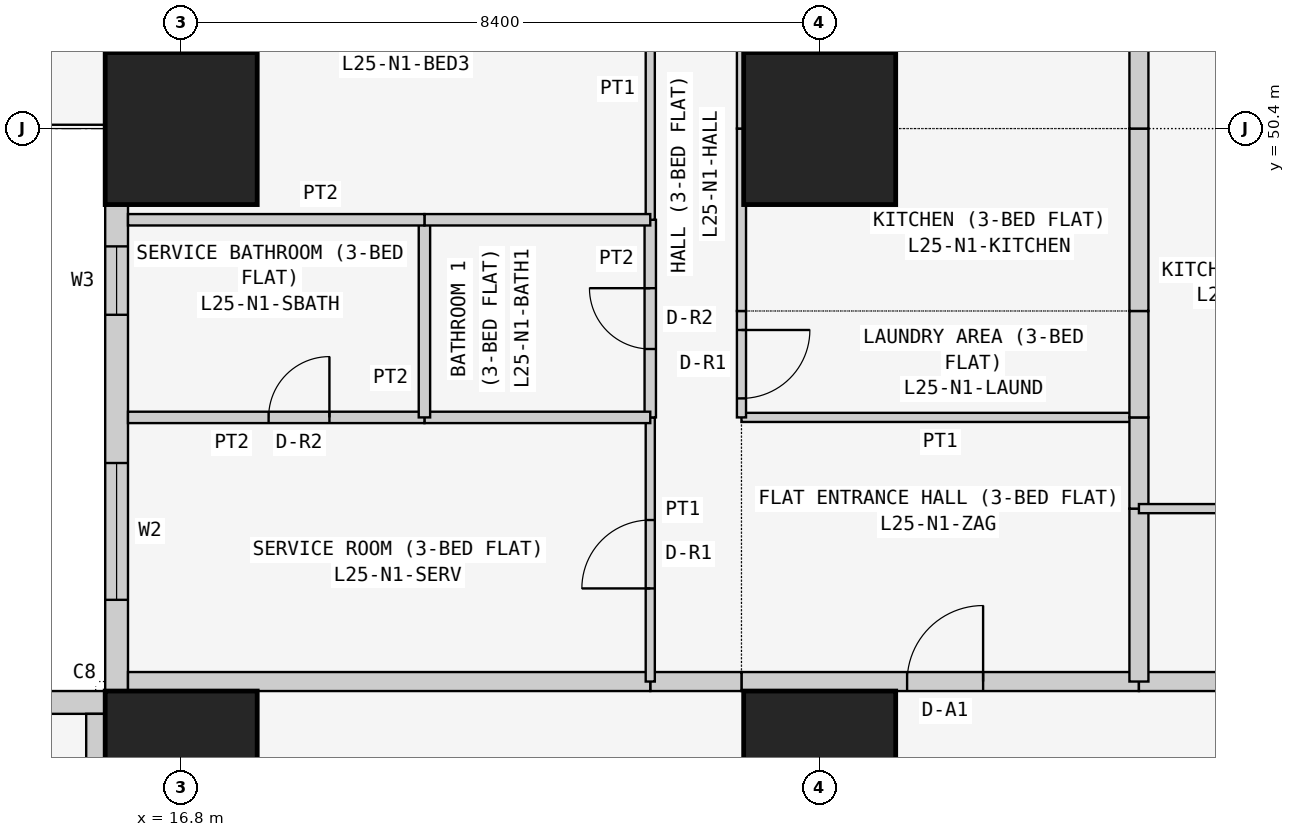
"""IFC4 building model, lengths in metres.
Left out: names, types, materials, properties, quantities, classifications, styles, units other than length and angle.
Written with IfcOpenShell. Run it as: python <this file> out.ifc"""

import sys

from ifc_helpers import new_model, si_unit, direction, frame, frame_2d, origin, origin_2d, place, context, subcontext, project, spatial, rectangle, extrude, element, fill, save


model = new_model("IFC4")
c1 = context("Model", 3, precision=1e-05, world=origin(), true_north=direction((0.0, 1.0)))
c2 = subcontext(c1, "Body", "Model", "MODEL_VIEW")
j1 = project(units=[si_unit("LENGTHUNIT", "METRE"), si_unit("PLANEANGLEUNIT", "RADIAN")], contexts=[c1])
p1 = place(None, origin())
s1 = spatial("IfcSite", under=j1, at=p1, CompositionType="ELEMENT")
p2 = place(p1, origin())
s2 = spatial("IfcBuilding", under=s1, at=p2, CompositionType="ELEMENT")
p3 = place(p2, frame((0.0, 0.0, 99.3)))
s3 = spatial("IfcBuildingStorey", under=s2, at=p3, CompositionType="ELEMENT", Elevation=99.3)
for number, where, z_axis, x_axis in (
    (1, (16.8, 42.0, 0.0), (0.0, 0.0, 1.0), (1.0, 0.0, 0.0)),
    (2, (16.8, 50.4, 0.0), (0.0, 0.0, 1.0), (1.0, 0.0, 0.0)),
    (3, (25.2, 42.0, 0.0), (0.0, 0.0, 1.0), (1.0, 0.0, 0.0)),
    (4, (25.2, 50.4, 0.0), (0.0, 0.0, 1.0), (1.0, 0.0, 0.0)),
):
    element("IfcColumn", number, at=place(p3, frame(where, z_axis=z_axis, x_axis=x_axis)), inside=s3, PredefinedType="COLUMN", context=c2, shape_type="SweptSolid", body=[
        extrude(rectangle(XDim=2.0, YDim=2.0, at=origin_2d()), origin(), (0.0, 0.0, 1.0), 3.6),
    ])
p4 = place(p3, frame((15.8, 42.85, 0.0), z_axis=(0.0, 0.0, 1.0), x_axis=(-1.0, 0.0, 0.0)))
e5 = element("IfcWall", 5, at=p4, inside=s3, PredefinedType="SOLIDWALL", context=c2, shape_type="SweptSolid", body=[
    extrude(rectangle(XDim=15.4, YDim=0.3, at=frame_2d((7.7, 0.0))), origin(), (0.0, 0.0, 1.0), 3.35),
])
p5 = place(p4, frame((1.2, 0.0, 0.9)))
e6 = element("IfcOpeningElement", 6, at=p5, cuts=e5, PredefinedType="OPENING", context=c2, shape_type="SweptSolid", body=[
    extrude(rectangle(XDim=1.8, YDim=1.5, at=frame_2d((0.9, 0.75))), frame((0.0, 0.16, 0.0), z_axis=(0.0, -1.0, 0.0), x_axis=(1.0, 0.0, 0.0)), (0.0, 0.0, 1.0), 0.32),
])
p6 = place(p4, frame((4.95, 0.0, 1.5)))
e7 = element("IfcOpeningElement", 7, at=p6, cuts=e5, PredefinedType="OPENING", context=c2, shape_type="SweptSolid", body=[
    extrude(rectangle(XDim=0.9, YDim=0.7, at=frame_2d((0.45, 0.35))), frame((0.0, 0.16, 0.0), z_axis=(0.0, -1.0, 0.0), x_axis=(1.0, 0.0, 0.0)), (0.0, 0.0, 1.0), 0.32),
])
p7 = place(p4, frame((8.5, 0.0, 0.9)))
e8 = element("IfcOpeningElement", 8, at=p7, cuts=e5, PredefinedType="OPENING", context=c2, shape_type="SweptSolid", body=[
    extrude(rectangle(XDim=1.8, YDim=1.5, at=frame_2d((0.9, 0.75))), frame((0.0, 0.16, 0.0), z_axis=(0.0, -1.0, 0.0), x_axis=(1.0, 0.0, 0.0)), (0.0, 0.0, 1.0), 0.32),
])
p8 = place(p4, frame((12.5, 0.0, 0.0)))
e9 = element("IfcOpeningElement", 9, at=p8, cuts=e5, PredefinedType="OPENING", context=c2, shape_type="SweptSolid", body=[
    extrude(rectangle(XDim=0.9, YDim=2.4, at=frame_2d((0.45, 1.2))), frame((0.0, 0.16, 0.0), z_axis=(0.0, -1.0, 0.0), x_axis=(1.0, 0.0, 0.0)), (0.0, 0.0, 1.0), 0.32),
])
p9 = place(p4, frame((13.5, 0.0, 0.9)))
e10 = element("IfcOpeningElement", 10, at=p9, cuts=e5, PredefinedType="OPENING", context=c2, shape_type="SweptSolid", body=[
    extrude(rectangle(XDim=1.2, YDim=1.5, at=frame_2d((0.6, 0.75))), frame((0.0, 0.16, 0.0), z_axis=(0.0, -1.0, 0.0), x_axis=(1.0, 0.0, 0.0)), (0.0, 0.0, 1.0), 0.32),
])
p10 = place(p3, frame((15.95, 58.4, 0.0), z_axis=(0.0, 0.0, 1.0), x_axis=(0.0, -1.0, 0.0)))
e11 = element("IfcWall", 11, at=p10, inside=s3, PredefinedType="SOLIDWALL", context=c2, shape_type="SweptSolid", body=[
    extrude(rectangle(XDim=15.7, YDim=0.3, at=frame_2d((7.85, 0.0))), origin(), (0.0, 0.0, 1.0), 3.35),
])
p11 = place(p10, frame((12.4, 0.0, 0.9)))
e12 = element("IfcOpeningElement", 12, at=p11, cuts=e11, PredefinedType="OPENING", context=c2, shape_type="SweptSolid", body=[
    extrude(rectangle(XDim=1.8, YDim=1.5, at=frame_2d((0.9, 0.75))), frame((0.0, 0.16, 0.0), z_axis=(0.0, -1.0, 0.0), x_axis=(1.0, 0.0, 0.0)), (0.0, 0.0, 1.0), 0.32),
])
p12 = place(p10, frame((9.55, 0.0, 1.5)))
e13 = element("IfcOpeningElement", 13, at=p12, cuts=e11, PredefinedType="OPENING", context=c2, shape_type="SweptSolid", body=[
    extrude(rectangle(XDim=0.9, YDim=0.7, at=frame_2d((0.45, 0.35))), frame((0.0, 0.16, 0.0), z_axis=(0.0, -1.0, 0.0), x_axis=(1.0, 0.0, 0.0)), (0.0, 0.0, 1.0), 0.32),
])
p13 = place(p10, frame((5.1, 0.0, 0.9)))
e14 = element("IfcOpeningElement", 14, at=p13, cuts=e11, PredefinedType="OPENING", context=c2, shape_type="SweptSolid", body=[
    extrude(rectangle(XDim=1.8, YDim=1.5, at=frame_2d((0.9, 0.75))), frame((0.0, 0.16, 0.0), z_axis=(0.0, -1.0, 0.0), x_axis=(1.0, 0.0, 0.0)), (0.0, 0.0, 1.0), 0.32),
])
p14 = place(p10, frame((2.0, 0.0, 0.0)))
e15 = element("IfcOpeningElement", 15, at=p14, cuts=e11, PredefinedType="OPENING", context=c2, shape_type="SweptSolid", body=[
    extrude(rectangle(XDim=0.9, YDim=2.4, at=frame_2d((0.45, 1.2))), frame((0.0, 0.16, 0.0), z_axis=(0.0, -1.0, 0.0), x_axis=(1.0, 0.0, 0.0)), (0.0, 0.0, 1.0), 0.32),
])
p15 = place(p10, frame((0.7, 0.0, 0.9)))
e16 = element("IfcOpeningElement", 16, at=p15, cuts=e11, PredefinedType="OPENING", context=c2, shape_type="SweptSolid", body=[
    extrude(rectangle(XDim=1.2, YDim=1.5, at=frame_2d((0.6, 0.75))), frame((0.0, 0.16, 0.0), z_axis=(0.0, -1.0, 0.0), x_axis=(1.0, 0.0, 0.0)), (0.0, 0.0, 1.0), 0.32),
])
p16 = place(p3, frame((24.171, 43.125, 0.0), z_axis=(0.0, 0.0, 1.0), x_axis=(1.0, 0.0, 0.0)))
e17 = element("IfcWall", 17, at=p16, inside=s3, PredefinedType="PARTITIONING", context=c2, shape_type="SweptSolid", body=[
    extrude(rectangle(XDim=5.229, YDim=0.25, at=frame_2d((2.615, 0.0))), origin(), (0.0, 0.0, 1.0), 3.35),
])
p17 = place(p16, frame((2.179, 0.0, 0.0)))
e18 = element("IfcOpeningElement", 18, at=p17, cuts=e17, PredefinedType="OPENING", context=c2, shape_type="SweptSolid", body=[
    extrude(rectangle(XDim=1.0, YDim=2.1, at=frame_2d((0.5, 1.05))), frame((0.0, 0.135, 0.0), z_axis=(0.0, -1.0, 0.0), x_axis=(1.0, 0.0, 0.0)), (0.0, 0.0, 1.0), 0.27),
])
p18 = place(p3, frame((22.971, 43.125, 0.0), z_axis=(0.0, 0.0, 1.0), x_axis=(1.0, 0.0, 0.0)))
e19 = element("IfcWall", 19, at=p18, inside=s3, PredefinedType="PARTITIONING", context=c2, shape_type="SweptSolid", body=[
    extrude(rectangle(XDim=1.2, YDim=0.25, at=frame_2d((0.6, 0.0))), origin(), (0.0, 0.0, 1.0), 3.35),
])
p19 = place(p3, frame((16.1, 43.125, 0.0), z_axis=(0.0, 0.0, 1.0), x_axis=(1.0, 0.0, 0.0)))
e20 = element("IfcWall", 20, at=p19, inside=s3, PredefinedType="PARTITIONING", context=c2, shape_type="SweptSolid", body=[
    extrude(rectangle(XDim=6.871, YDim=0.25, at=frame_2d((3.436, 0.0))), origin(), (0.0, 0.0, 1.0), 3.35),
])
p20 = place(p3, frame((29.4, 43.125, 0.0), z_axis=(0.0, 0.0, 1.0), x_axis=(1.0, 0.0, 0.0)))
e21 = element("IfcWall", 21, at=p20, inside=s3, PredefinedType="PARTITIONING", context=c2, shape_type="SweptSolid", body=[
    extrude(rectangle(XDim=7.1, YDim=0.25, at=frame_2d((3.55, 0.0))), origin(), (0.0, 0.0, 1.0), 3.35),
])
p21 = place(p20, frame((2.0, 0.0, 0.0)))
e22 = element("IfcOpeningElement", 22, at=p21, cuts=e21, PredefinedType="OPENING", context=c2, shape_type="SweptSolid", body=[
    extrude(rectangle(XDim=1.0, YDim=2.1, at=frame_2d((0.5, 1.05))), frame((0.0, 0.135, 0.0), z_axis=(0.0, -1.0, 0.0), x_axis=(1.0, 0.0, 0.0)), (0.0, 0.0, 1.0), 0.27),
])
p22 = place(p3, frame((15.675, 35.829, 0.0), z_axis=(0.0, 0.0, 1.0), x_axis=(0.0, 1.0, 0.0)))
e23 = element("IfcWall", 23, at=p22, inside=s3, PredefinedType="PARTITIONING", context=c2, shape_type="SweptSolid", body=[
    extrude(rectangle(XDim=6.871, YDim=0.25, at=frame_2d((3.436, 0.0))), origin(), (0.0, 0.0, 1.0), 3.35),
])
p23 = place(p3, frame((29.4, 46.6, 0.0), z_axis=(0.0, 0.0, 1.0), x_axis=(-1.0, 0.0, 0.0)))
e24 = element("IfcWall", 24, at=p23, inside=s3, PredefinedType="PARTITIONING", context=c2, shape_type="SweptSolid", body=[
    extrude(rectangle(XDim=5.229, YDim=0.12, at=frame_2d((2.615, 0.0))), origin(), (0.0, 0.0, 1.0), 3.35),
])
p24 = place(p3, frame((29.4, 43.125, 0.0), z_axis=(0.0, 0.0, 1.0), x_axis=(0.0, 1.0, 0.0)))
e25 = element("IfcWall", 25, at=p24, inside=s3, PredefinedType="PARTITIONING", context=c2, shape_type="SweptSolid", body=[
    extrude(rectangle(XDim=2.275, YDim=0.25, at=frame_2d((1.137, 0.0))), origin(), (0.0, 0.0, 1.0), 2.667),
])
p25 = place(p3, frame((29.4, 45.4, 0.0), z_axis=(0.0, 0.0, 1.0), x_axis=(0.0, 1.0, 0.0)))
e26 = element("IfcWall", 26, at=p25, inside=s3, PredefinedType="PARTITIONING", context=c2, shape_type="SweptSolid", body=[
    extrude(rectangle(XDim=1.2, YDim=0.25, at=frame_2d((0.6, 0.0))), origin(), (0.0, 0.0, 1.0), 2.667),
])
p26 = place(p3, frame((24.171, 48.0, 0.0), z_axis=(0.0, 0.0, 1.0), x_axis=(0.0, -1.0, 0.0)))
e27 = element("IfcWall", 27, at=p26, inside=s3, PredefinedType="PARTITIONING", context=c2, shape_type="SweptSolid", body=[
    extrude(rectangle(XDim=1.4, YDim=0.12, at=frame_2d((0.7, 0.0))), origin(), (0.0, 0.0, 1.0), 3.35),
])
p27 = place(p26, frame((0.25, 0.0, 0.0)))
e28 = element("IfcOpeningElement", 28, at=p27, cuts=e27, PredefinedType="OPENING", context=c2, shape_type="SweptSolid", body=[
    extrude(rectangle(XDim=0.9, YDim=2.1, at=frame_2d((0.45, 1.05))), frame((0.0, 0.07, 0.0), z_axis=(0.0, -1.0, 0.0), x_axis=(1.0, 0.0, 0.0)), (0.0, 0.0, 1.0), 0.14),
])
p28 = place(p3, frame((29.4, 46.6, 0.0), z_axis=(0.0, 0.0, 1.0), x_axis=(0.0, 1.0, 0.0)))
e29 = element("IfcWall", 29, at=p28, inside=s3, PredefinedType="PARTITIONING", context=c2, shape_type="SweptSolid", body=[
    extrude(rectangle(XDim=1.4, YDim=0.25, at=frame_2d((0.7, 0.0))), origin(), (0.0, 0.0, 1.0), 2.667),
])
p29 = place(p3, frame((24.171, 50.4, 0.0), z_axis=(0.0, 0.0, 1.0), x_axis=(0.0, -1.0, 0.0)))
e30 = element("IfcWall", 30, at=p29, inside=s3, PredefinedType="PARTITIONING", context=c2, shape_type="SweptSolid", body=[
    extrude(rectangle(XDim=2.4, YDim=0.12, at=frame_2d((1.2, 0.0))), origin(), (0.0, 0.0, 1.0), 3.35),
])
p30 = place(p3, frame((29.4, 48.0, 0.0), z_axis=(0.0, 0.0, 1.0), x_axis=(0.0, 1.0, 0.0)))
e31 = element("IfcWall", 31, at=p30, inside=s3, PredefinedType="PARTITIONING", context=c2, shape_type="SweptSolid", body=[
    extrude(rectangle(XDim=2.4, YDim=0.25, at=frame_2d((1.2, 0.0))), origin(), (0.0, 0.0, 1.0), 2.667),
])
p31 = place(p3, frame((24.171, 55.3, 0.0), z_axis=(0.0, 0.0, 1.0), x_axis=(0.0, -1.0, 0.0)))
e32 = element("IfcWall", 32, at=p31, inside=s3, PredefinedType="PARTITIONING", context=c2, shape_type="SweptSolid", body=[
    extrude(rectangle(XDim=4.9, YDim=0.12, at=frame_2d((2.45, 0.0))), origin(), (0.0, 0.0, 1.0), 3.35),
])
p32 = place(p31, frame((1.25, 0.0, 0.0)))
e33 = element("IfcOpeningElement", 33, at=p32, cuts=e32, PredefinedType="OPENING", context=c2, shape_type="SweptSolid", body=[
    extrude(rectangle(XDim=0.9, YDim=2.1, at=frame_2d((0.45, 1.05))), frame((0.0, 0.07, 0.0), z_axis=(0.0, -1.0, 0.0), x_axis=(1.0, 0.0, 0.0)), (0.0, 0.0, 1.0), 0.14),
])
p33 = place(p3, frame((29.4, 50.4, 0.0), z_axis=(0.0, 0.0, 1.0), x_axis=(0.0, 1.0, 0.0)))
e34 = element("IfcWall", 34, at=p33, inside=s3, PredefinedType="PARTITIONING", context=c2, shape_type="SweptSolid", body=[
    extrude(rectangle(XDim=9.05, YDim=0.25, at=frame_2d((4.525, 0.0))), origin(), (0.0, 0.0, 1.0), 2.667),
])
p34 = place(p3, frame((22.971, 46.6, 0.0), z_axis=(0.0, 0.0, 1.0), x_axis=(0.0, -1.0, 0.0)))
e35 = element("IfcWall", 35, at=p34, inside=s3, PredefinedType="PARTITIONING", context=c2, shape_type="SweptSolid", body=[
    extrude(rectangle(XDim=3.475, YDim=0.12, at=frame_2d((1.738, 0.0))), origin(), (0.0, 0.0, 1.0), 3.35),
])
p35 = place(p34, frame((1.35, 0.0, 0.0)))
e36 = element("IfcOpeningElement", 36, at=p35, cuts=e35, PredefinedType="OPENING", context=c2, shape_type="SweptSolid", body=[
    extrude(rectangle(XDim=0.9, YDim=2.1, at=frame_2d((0.45, 1.05))), frame((0.0, 0.07, 0.0), z_axis=(0.0, -1.0, 0.0), x_axis=(1.0, 0.0, 0.0)), (0.0, 0.0, 1.0), 0.14),
])
p36 = place(p3, frame((22.971, 49.2, 0.0), z_axis=(0.0, 0.0, 1.0), x_axis=(0.0, -1.0, 0.0)))
e37 = element("IfcWall", 37, at=p36, inside=s3, PredefinedType="PARTITIONING", context=c2, shape_type="SweptSolid", body=[
    extrude(rectangle(XDim=2.6, YDim=0.15, at=frame_2d((1.3, 0.0))), origin(), (0.0, 0.0, 1.0), 3.35),
])
p37 = place(p36, frame((0.9, 0.0, 0.0)))
e38 = element("IfcOpeningElement", 38, at=p37, cuts=e37, PredefinedType="OPENING", context=c2, shape_type="SweptSolid", body=[
    extrude(rectangle(XDim=0.8, YDim=2.1, at=frame_2d((0.4, 1.05))), frame((0.0, 0.085, 0.0), z_axis=(0.0, -1.0, 0.0), x_axis=(1.0, 0.0, 0.0)), (0.0, 0.0, 1.0), 0.17),
])
p38 = place(p3, frame((22.971, 54.1, 0.0), z_axis=(0.0, 0.0, 1.0), x_axis=(0.0, -1.0, 0.0)))
e39 = element("IfcWall", 39, at=p38, inside=s3, PredefinedType="PARTITIONING", context=c2, shape_type="SweptSolid", body=[
    extrude(rectangle(XDim=4.9, YDim=0.12, at=frame_2d((2.45, 0.0))), origin(), (0.0, 0.0, 1.0), 3.35),
])
p39 = place(p38, frame((1.65, 0.0, 0.0)))
e40 = element("IfcOpeningElement", 40, at=p39, cuts=e39, PredefinedType="OPENING", context=c2, shape_type="SweptSolid", body=[
    extrude(rectangle(XDim=0.9, YDim=2.1, at=frame_2d((0.45, 1.05))), frame((0.0, 0.07, 0.0), z_axis=(0.0, -1.0, 0.0), x_axis=(1.0, 0.0, 0.0)), (0.0, 0.0, 1.0), 0.14),
])
p40 = place(p3, frame((22.971, 46.6, 0.0), z_axis=(0.0, 0.0, 1.0), x_axis=(-1.0, 0.0, 0.0)))
e41 = element("IfcWall", 41, at=p40, inside=s3, PredefinedType="PARTITIONING", context=c2, shape_type="SweptSolid", body=[
    extrude(rectangle(XDim=2.971, YDim=0.15, at=frame_2d((1.485, 0.0))), origin(), (0.0, 0.0, 1.0), 3.35),
])
p41 = place(p3, frame((20.0, 46.6, 0.0), z_axis=(0.0, 0.0, 1.0), x_axis=(-1.0, 0.0, 0.0)))
e42 = element("IfcWall", 42, at=p41, inside=s3, PredefinedType="PARTITIONING", context=c2, shape_type="SweptSolid", body=[
    extrude(rectangle(XDim=3.9, YDim=0.15, at=frame_2d((1.95, 0.0))), origin(), (0.0, 0.0, 1.0), 3.35),
])
p42 = place(p41, frame((1.25, 0.0, 0.0)))
e43 = element("IfcOpeningElement", 43, at=p42, cuts=e42, PredefinedType="OPENING", context=c2, shape_type="SweptSolid", body=[
    extrude(rectangle(XDim=0.8, YDim=2.1, at=frame_2d((0.4, 1.05))), frame((0.0, 0.085, 0.0), z_axis=(0.0, -1.0, 0.0), x_axis=(1.0, 0.0, 0.0)), (0.0, 0.0, 1.0), 0.17),
])
p43 = place(p3, frame((20.0, 49.2, 0.0), z_axis=(0.0, 0.0, 1.0), x_axis=(0.0, -1.0, 0.0)))
e44 = element("IfcWall", 44, at=p43, inside=s3, PredefinedType="PARTITIONING", context=c2, shape_type="SweptSolid", body=[
    extrude(rectangle(XDim=2.6, YDim=0.15, at=frame_2d((1.3, 0.0))), origin(), (0.0, 0.0, 1.0), 3.35),
])
p44 = place(p3, frame((22.971, 49.2, 0.0), z_axis=(0.0, 0.0, 1.0), x_axis=(-1.0, 0.0, 0.0)))
e45 = element("IfcWall", 45, at=p44, inside=s3, PredefinedType="PARTITIONING", context=c2, shape_type="SweptSolid", body=[
    extrude(rectangle(XDim=2.971, YDim=0.15, at=frame_2d((1.485, 0.0))), origin(), (0.0, 0.0, 1.0), 3.35),
])
p45 = place(p3, frame((20.0, 49.2, 0.0), z_axis=(0.0, 0.0, 1.0), x_axis=(-1.0, 0.0, 0.0)))
e46 = element("IfcWall", 46, at=p45, inside=s3, PredefinedType="PARTITIONING", context=c2, shape_type="SweptSolid", body=[
    extrude(rectangle(XDim=3.9, YDim=0.15, at=frame_2d((1.95, 0.0))), origin(), (0.0, 0.0, 1.0), 3.35),
])
p46 = place(p3, frame((29.4, 45.4, 0.0), z_axis=(0.0, 0.0, 1.0), x_axis=(1.0, 0.0, 0.0)))
e47 = element("IfcWall", 47, at=p46, inside=s3, PredefinedType="PARTITIONING", context=c2, shape_type="SweptSolid", body=[
    extrude(rectangle(XDim=4.0, YDim=0.12, at=frame_2d((2.0, 0.0))), origin(), (0.0, 0.0, 1.0), 3.35),
])
p47 = place(p46, frame((1.05, 0.0, 0.0)))
e48 = element("IfcOpeningElement", 48, at=p47, cuts=e47, PredefinedType="OPENING", context=c2, shape_type="SweptSolid", body=[
    extrude(rectangle(XDim=0.9, YDim=2.1, at=frame_2d((0.45, 1.05))), frame((0.0, 0.07, 0.0), z_axis=(0.0, -1.0, 0.0), x_axis=(1.0, 0.0, 0.0)), (0.0, 0.0, 1.0), 0.14),
])
p48 = place(p11, origin())
e49 = element("IfcWindow", 49, at=p48, inside=s3, PartitioningType="SINGLE_PANEL", PredefinedType="WINDOW", context=c2, shape_type="SweptSolid", body=[
    extrude(rectangle(XDim=1.8, YDim=1.5, at=frame_2d((0.9, 0.75))), frame((0.0, 0.03, 0.0), z_axis=(0.0, -1.0, 0.0), x_axis=(1.0, 0.0, 0.0)), (0.0, 0.0, 1.0), 0.06),
])
fill(e12, e49)
p49 = place(p12, origin())
e50 = element("IfcWindow", 50, at=p49, inside=s3, PartitioningType="SINGLE_PANEL", PredefinedType="WINDOW", context=c2, shape_type="SweptSolid", body=[
    extrude(rectangle(XDim=0.9, YDim=0.7, at=frame_2d((0.45, 0.35))), frame((0.0, 0.03, 0.0), z_axis=(0.0, -1.0, 0.0), x_axis=(1.0, 0.0, 0.0)), (0.0, 0.0, 1.0), 0.06),
])
fill(e13, e50)
p50 = place(p17, origin())
e51 = element("IfcDoor", 51, at=p50, inside=s3, OperationType="SINGLE_SWING_RIGHT", PredefinedType="DOOR", context=c2, shape_type="SweptSolid", body=[
    extrude(rectangle(XDim=1.0, YDim=2.1, at=frame_2d((0.5, 1.05))), frame((0.0, 0.025, 0.0), z_axis=(0.0, -1.0, 0.0), x_axis=(1.0, 0.0, 0.0)), (0.0, 0.0, 1.0), 0.05),
])
fill(e18, e51)
p51 = place(p27, origin())
e52 = element("IfcDoor", 52, at=p51, inside=s3, OperationType="SINGLE_SWING_LEFT", PredefinedType="DOOR", context=c2, shape_type="SweptSolid", body=[
    extrude(rectangle(XDim=0.9, YDim=2.1, at=frame_2d((0.45, 1.05))), frame((0.0, 0.025, 0.0), z_axis=(0.0, -1.0, 0.0), x_axis=(1.0, 0.0, 0.0)), (0.0, 0.0, 1.0), 0.05),
])
fill(e28, e52)
p52 = place(p35, frame((0.9, 0.0, 0.0), z_axis=(0.0, 0.0, 1.0), x_axis=(-1.0, 0.0, 0.0)))
e53 = element("IfcDoor", 53, at=p52, inside=s3, OperationType="SINGLE_SWING_LEFT", PredefinedType="DOOR", context=c2, shape_type="SweptSolid", body=[
    extrude(rectangle(XDim=0.9, YDim=2.1, at=frame_2d((0.45, 1.05))), frame((0.0, 0.025, 0.0), z_axis=(0.0, -1.0, 0.0), x_axis=(1.0, 0.0, 0.0)), (0.0, 0.0, 1.0), 0.05),
])
fill(e36, e53)
p53 = place(p42, frame((0.8, 0.0, 0.0), z_axis=(0.0, 0.0, 1.0), x_axis=(-1.0, 0.0, 0.0)))
e54 = element("IfcDoor", 54, at=p53, inside=s3, OperationType="SINGLE_SWING_RIGHT", PredefinedType="DOOR", context=c2, shape_type="SweptSolid", body=[
    extrude(rectangle(XDim=0.8, YDim=2.1, at=frame_2d((0.4, 1.05))), frame((0.0, 0.025, 0.0), z_axis=(0.0, -1.0, 0.0), x_axis=(1.0, 0.0, 0.0)), (0.0, 0.0, 1.0), 0.05),
])
fill(e43, e54)
p54 = place(p37, frame((0.8, 0.0, 0.0), z_axis=(0.0, 0.0, 1.0), x_axis=(-1.0, 0.0, 0.0)))
e55 = element("IfcDoor", 55, at=p54, inside=s3, OperationType="SINGLE_SWING_RIGHT", PredefinedType="DOOR", context=c2, shape_type="SweptSolid", body=[
    extrude(rectangle(XDim=0.8, YDim=2.1, at=frame_2d((0.4, 1.05))), frame((0.0, 0.025, 0.0), z_axis=(0.0, -1.0, 0.0), x_axis=(1.0, 0.0, 0.0)), (0.0, 0.0, 1.0), 0.05),
])
fill(e38, e55)
save(model, sys.argv[1])
